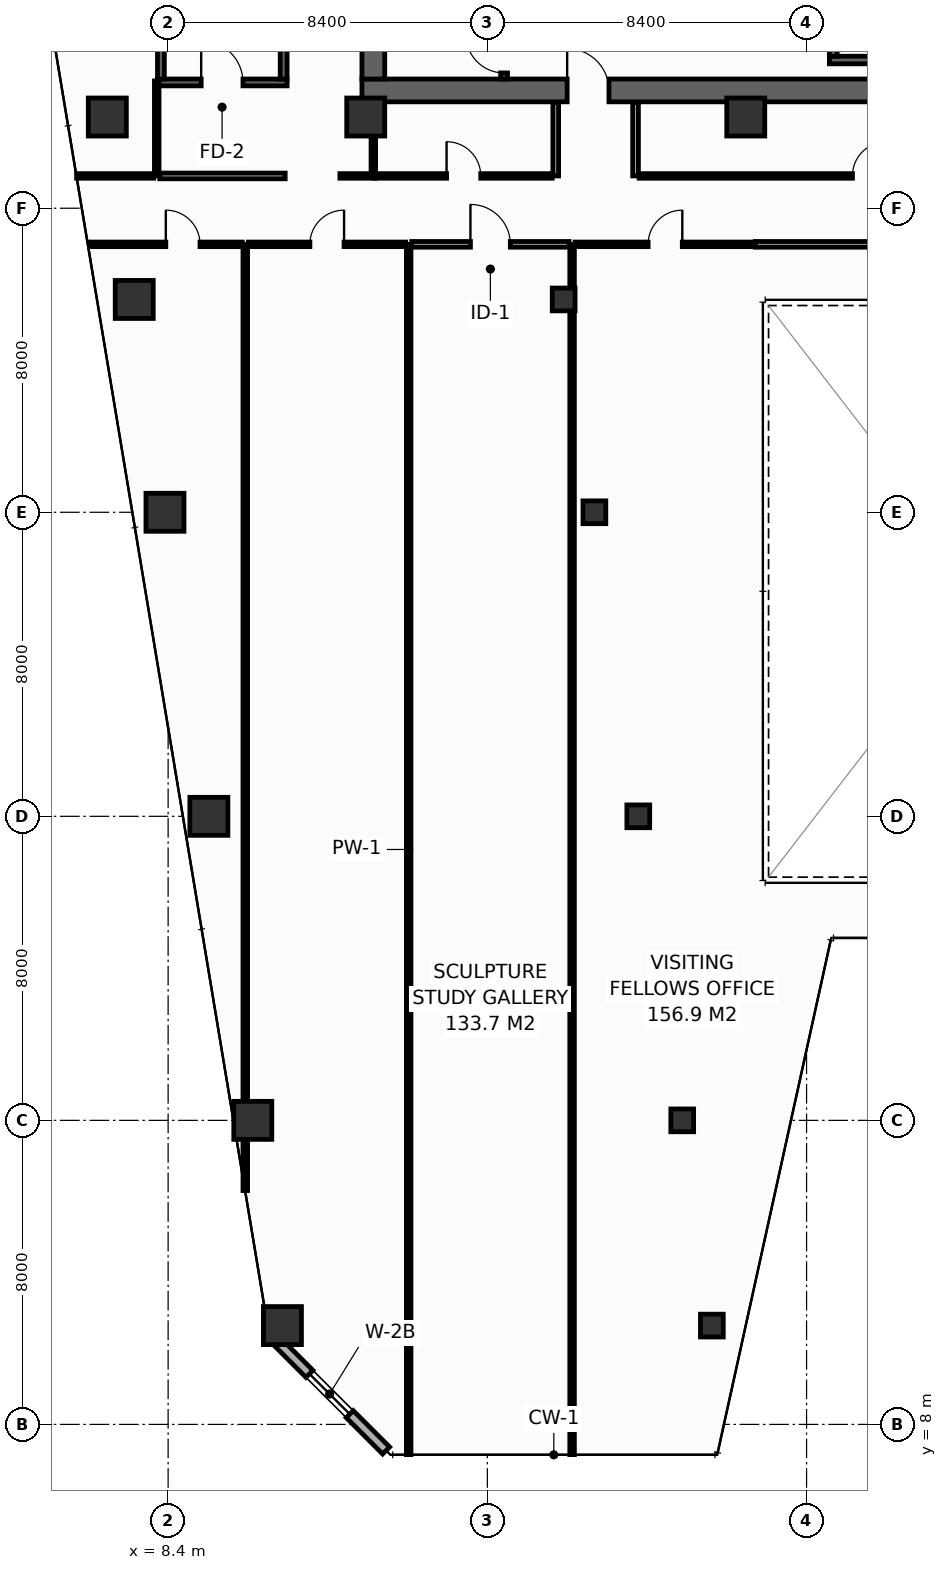
"""IFC4 building model, lengths in metres.
Left out: names, types, materials, properties, quantities, classifications, styles, units other than length and angle.
Written with IfcOpenShell. Run it as: python <this file> out.ifc"""

import sys

from ifc_helpers import new_model, si_unit, direction, frame, frame_2d, origin, origin_2d, place, context, subcontext, project, spatial, rectangle, hollow_rectangle, extrude, element, fill, save


model = new_model("IFC4")
c1 = context("Model", 3, precision=1e-05, world=origin(), true_north=direction((0.0, 1.0)))
c2 = subcontext(c1, "Body", "Model", "MODEL_VIEW")
j1 = project(units=[si_unit("LENGTHUNIT", "METRE"), si_unit("PLANEANGLEUNIT", "RADIAN")], contexts=[c1])
p1 = place(None, origin())
s1 = spatial("IfcSite", under=j1, at=p1, CompositionType="ELEMENT")
p2 = place(p1, origin())
s2 = spatial("IfcBuilding", under=s1, at=p2, CompositionType="ELEMENT")
p3 = place(p2, frame((0.0, 0.0, 114.8)))
s3 = spatial("IfcBuildingStorey", under=s2, at=p3, CompositionType="ELEMENT", Elevation=114.8)
p4 = place(p3, frame((13.5, 43.1, 0.0), z_axis=(0.0, 0.0, 1.0), x_axis=(1.0, 0.0, 0.0)))
e1 = element("IfcWall", 1, at=p4, inside=s3, PredefinedType="SHEAR", context=c2, shape_type="SweptSolid", body=[
    extrude(rectangle(XDim=32.9, YDim=0.6, at=frame_2d((16.45, 0.0))), origin(), (0.0, 0.0, 1.0), 4.15),
])
p5 = place(p4, frame((5.4, 0.0, 0.0)))
e2 = element("IfcOpeningElement", 2, at=p5, cuts=e1, PredefinedType="OPENING", context=c2, shape_type="SweptSolid", body=[
    extrude(rectangle(XDim=1.1, YDim=2.15, at=frame_2d((0.55, 1.075))), frame((0.0, 0.31, 0.0), z_axis=(0.0, -1.0, 0.0), x_axis=(1.0, 0.0, 0.0)), (0.0, 0.0, 1.0), 0.62),
])
p6 = place(p4, frame((25.6, 0.0, 0.0)))
e3 = element("IfcOpeningElement", 3, at=p6, cuts=e1, PredefinedType="OPENING", context=c2, shape_type="SweptSolid", body=[
    extrude(rectangle(XDim=1.1, YDim=2.15, at=frame_2d((0.55, 1.075))), frame((0.0, 0.31, 0.0), z_axis=(0.0, -1.0, 0.0), x_axis=(1.0, 0.0, 0.0)), (0.0, 0.0, 1.0), 0.62),
])
p7 = place(p3, frame((13.8, 43.4, 0.0), z_axis=(0.0, 0.0, 1.0), x_axis=(0.0, 1.0, 0.0)))
e4 = element("IfcWall", 4, at=p7, inside=s3, PredefinedType="SHEAR", context=c2, shape_type="SweptSolid", body=[
    extrude(rectangle(XDim=10.4, YDim=0.6, at=frame_2d((5.2, 0.0))), origin(), (0.0, 0.0, 1.0), 4.15),
])
for number, where, z_axis, x_axis in (
    (5, (6.8, 42.4, 0.0), (0.0, 0.0, 1.0), (1.0, 0.0, 0.0)),
    (6, (13.6, 42.4, 0.0), (0.0, 0.0, 1.0), (1.0, 0.0, 0.0)),
    (7, (23.6, 42.4, 0.0), (0.0, 0.0, 1.0), (1.0, 0.0, 0.0)),
    (8, (11.408, 10.6, 0.0), (0.0, 0.0, 1.0), (1.0, 0.0, 0.0)),
):
    element("IfcColumn", number, at=place(p3, frame(where, z_axis=z_axis, x_axis=x_axis)), inside=s3, PredefinedType="COLUMN", context=c2, shape_type="SweptSolid", body=[
        extrude(hollow_rectangle(XDim=1.0, YDim=1.0, WallThickness=0.045, at=origin_2d()), origin(), (0.0, 0.0, 1.0), 4.4),
    ])
p8 = place(p3, frame((22.708, 10.6, 0.0), z_axis=(0.0, 0.0, 1.0), x_axis=(1.0, 0.0, 0.0)))
e9 = element("IfcColumn", 9, at=p8, inside=s3, PredefinedType="COLUMN", context=c2, shape_type="SweptSolid", body=[
    extrude(hollow_rectangle(XDim=0.6, YDim=0.6, WallThickness=0.028, at=origin_2d()), origin(), (0.0, 0.0, 1.0), 4.4),
])
p9 = place(p3, frame((10.628, 16.0, 0.0), z_axis=(0.0, 0.0, 1.0), x_axis=(1.0, 0.0, 0.0)))
e10 = element("IfcColumn", 10, at=p9, inside=s3, PredefinedType="COLUMN", context=c2, shape_type="SweptSolid", body=[
    extrude(hollow_rectangle(XDim=1.0, YDim=1.0, WallThickness=0.045, at=origin_2d()), origin(), (0.0, 0.0, 1.0), 4.4),
])
p10 = place(p3, frame((21.928, 16.0, 0.0), z_axis=(0.0, 0.0, 1.0), x_axis=(1.0, 0.0, 0.0)))
e11 = element("IfcColumn", 11, at=p10, inside=s3, PredefinedType="COLUMN", context=c2, shape_type="SweptSolid", body=[
    extrude(hollow_rectangle(XDim=0.6, YDim=0.6, WallThickness=0.028, at=origin_2d()), origin(), (0.0, 0.0, 1.0), 4.4),
])
p11 = place(p3, frame((9.472, 24.0, 0.0), z_axis=(0.0, 0.0, 1.0), x_axis=(1.0, 0.0, 0.0)))
e12 = element("IfcColumn", 12, at=p11, inside=s3, PredefinedType="COLUMN", context=c2, shape_type="SweptSolid", body=[
    extrude(hollow_rectangle(XDim=1.0, YDim=1.0, WallThickness=0.045, at=origin_2d()), origin(), (0.0, 0.0, 1.0), 4.4),
])
p12 = place(p3, frame((20.772, 24.0, 0.0), z_axis=(0.0, 0.0, 1.0), x_axis=(1.0, 0.0, 0.0)))
e13 = element("IfcColumn", 13, at=p12, inside=s3, PredefinedType="COLUMN", context=c2, shape_type="SweptSolid", body=[
    extrude(hollow_rectangle(XDim=0.6, YDim=0.6, WallThickness=0.028, at=origin_2d()), origin(), (0.0, 0.0, 1.0), 4.4),
])
p13 = place(p3, frame((8.317, 32.0, 0.0), z_axis=(0.0, 0.0, 1.0), x_axis=(1.0, 0.0, 0.0)))
e14 = element("IfcColumn", 14, at=p13, inside=s3, PredefinedType="COLUMN", context=c2, shape_type="SweptSolid", body=[
    extrude(hollow_rectangle(XDim=1.0, YDim=1.0, WallThickness=0.045, at=origin_2d()), origin(), (0.0, 0.0, 1.0), 4.4),
])
p14 = place(p3, frame((19.617, 32.0, 0.0), z_axis=(0.0, 0.0, 1.0), x_axis=(1.0, 0.0, 0.0)))
e15 = element("IfcColumn", 15, at=p14, inside=s3, PredefinedType="COLUMN", context=c2, shape_type="SweptSolid", body=[
    extrude(hollow_rectangle(XDim=0.6, YDim=0.6, WallThickness=0.028, at=origin_2d()), origin(), (0.0, 0.0, 1.0), 4.4),
])
p15 = place(p3, frame((7.508, 37.6, 0.0), z_axis=(0.0, 0.0, 1.0), x_axis=(1.0, 0.0, 0.0)))
e16 = element("IfcColumn", 16, at=p15, inside=s3, PredefinedType="COLUMN", context=c2, shape_type="SweptSolid", body=[
    extrude(hollow_rectangle(XDim=1.0, YDim=1.0, WallThickness=0.045, at=origin_2d()), origin(), (0.0, 0.0, 1.0), 4.4),
])
p16 = place(p3, frame((18.808, 37.6, 0.0), z_axis=(0.0, 0.0, 1.0), x_axis=(1.0, 0.0, 0.0)))
e17 = element("IfcColumn", 17, at=p16, inside=s3, PredefinedType="COLUMN", context=c2, shape_type="SweptSolid", body=[
    extrude(hollow_rectangle(XDim=0.6, YDim=0.6, WallThickness=0.028, at=origin_2d()), origin(), (0.0, 0.0, 1.0), 4.4),
])
p17 = place(p3, frame((25.8, 43.9, 0.0), z_axis=(0.0, 0.0, 1.0), x_axis=(1.0, 0.0, 0.0)))
e18 = element("IfcWall", 18, at=p17, inside=s3, PredefinedType="SHEAR", context=c2, shape_type="SweptSolid", body=[
    extrude(rectangle(XDim=2.575, YDim=0.2, at=frame_2d((1.288, 0.0))), origin(), (0.0, 0.0, 1.0), 4.15),
])
p18 = place(p3, frame((25.9, 44.0, 0.0), z_axis=(0.0, 0.0, 1.0), x_axis=(0.0, 1.0, 0.0)))
e19 = element("IfcWall", 19, at=p18, inside=s3, PredefinedType="SHEAR", context=c2, shape_type="SweptSolid", body=[
    extrude(rectangle(XDim=2.3, YDim=0.2, at=frame_2d((1.15, 0.0))), origin(), (0.0, 0.0, 1.0), 4.15),
])
p19 = place(p3, frame((17.24, 43.4, 0.0), z_axis=(0.0, 0.0, 1.0), x_axis=(0.0, 1.0, 0.0)))
e20 = element("IfcWall", 20, at=p19, inside=s3, PredefinedType="SHEAR", context=c2, shape_type="SweptSolid", body=[
    extrude(rectangle(XDim=10.4, YDim=0.18, at=frame_2d((5.2, 0.0))), origin(), (0.0, 0.0, 1.0), 4.15),
])
p20 = place(p19, frame((0.16, 0.0, 0.0)))
e21 = element("IfcOpeningElement", 21, at=p20, cuts=e20, PredefinedType="OPENING", context=c2, shape_type="SweptSolid", body=[
    extrude(rectangle(XDim=1.0, YDim=2.15, at=frame_2d((0.5, 1.075))), frame((0.0, 0.1, 0.0), z_axis=(0.0, -1.0, 0.0), x_axis=(1.0, 0.0, 0.0)), (0.0, 0.0, 1.0), 0.2),
])
p21 = place(p3, frame((8.12, 43.31, 0.0), z_axis=(0.0, 0.0, 1.0), x_axis=(1.0, 0.0, 0.0)))
e22 = element("IfcWall", 22, at=p21, inside=s3, PredefinedType="SHEAR", context=c2, shape_type="SweptSolid", body=[
    extrude(rectangle(XDim=3.41, YDim=0.18, at=frame_2d((1.705, 0.0))), origin(), (0.0, 0.0, 1.0), 4.15),
])
p22 = place(p21, frame((1.15, 0.0, 0.0)))
e23 = element("IfcOpeningElement", 23, at=p22, cuts=e22, PredefinedType="OPENING", context=c2, shape_type="SweptSolid", body=[
    extrude(rectangle(XDim=1.1, YDim=2.15, at=frame_2d((0.55, 1.075))), frame((0.0, 0.1, 0.0), z_axis=(0.0, -1.0, 0.0), x_axis=(1.0, 0.0, 0.0)), (0.0, 0.0, 1.0), 0.2),
])
for number, where, z_axis, x_axis in (
    (24, (11.44, 43.4, 0.0), (0.0, 0.0, 1.0), (0.0, 1.0, 0.0)),
    (25, (8.21, 53.8, 0.0), (0.0, 0.0, 1.0), (0.0, -1.0, 0.0)),
):
    element("IfcWall", number, at=place(p3, frame(where, z_axis=z_axis, x_axis=x_axis)), inside=s3, PredefinedType="SHEAR", context=c2, shape_type="SweptSolid", body=[
        extrude(rectangle(XDim=10.4, YDim=0.18, at=frame_2d((5.2, 0.0))), origin(), (0.0, 0.0, 1.0), 4.15),
    ])
p23 = place(p3, frame((11.162, 10.287, 0.0), z_axis=(0.0, 0.0, 1.0), x_axis=(0.70707775441, -0.707135806771, 0.0)))
e26 = element("IfcWall", 26, at=p23, inside=s3, PredefinedType="STANDARD", context=c2, shape_type="SweptSolid", body=[
    extrude(rectangle(XDim=4.206, YDim=0.26, at=frame_2d((2.103, 0.0))), origin(), (0.0, 0.0, 1.0), 4.15),
])
p24 = place(p23, frame((1.353, 0.0, 0.9)))
e27 = element("IfcOpeningElement", 27, at=p24, cuts=e26, PredefinedType="OPENING", context=c2, shape_type="SweptSolid", body=[
    extrude(rectangle(XDim=1.5, YDim=1.85, at=frame_2d((0.75, 0.925))), frame((0.0, 0.14, 0.0), z_axis=(0.0, -1.0, 0.0), x_axis=(1.0, 0.0, 0.0)), (0.0, 0.0, 1.0), 0.28),
])
p25 = place(p3, frame((12.92, 40.85, 0.0), z_axis=(0.0, 0.0, 1.0), x_axis=(1.0, 0.0, 0.0)))
e28 = element("IfcWall", 28, at=p25, inside=s3, PredefinedType="PARTITIONING", context=c2, shape_type="SweptSolid", body=[
    extrude(rectangle(XDim=0.93, YDim=0.12, at=frame_2d((0.465, 0.0))), origin(), (0.0, 0.0, 1.0), 4.15),
])
p26 = place(p3, frame((13.8, 40.93, 0.0), z_axis=(0.0, 0.0, 1.0), x_axis=(0.0, 1.0, 0.0)))
e29 = element("IfcWall", 29, at=p26, inside=s3, PredefinedType="PARTITIONING", context=c2, shape_type="SweptSolid", body=[
    extrude(rectangle(XDim=1.85, YDim=0.12, at=frame_2d((0.925, 0.0))), origin(), (0.0, 0.0, 1.0), 4.15),
])
p27 = place(p3, frame((8.1, 40.85, 0.0), z_axis=(0.0, 0.0, 1.0), x_axis=(0.0, 1.0, 0.0)))
e30 = element("IfcWall", 30, at=p27, inside=s3, PredefinedType="PARTITIONING", context=c2, shape_type="SweptSolid", body=[
    extrude(rectangle(XDim=2.5, YDim=0.12, at=frame_2d((1.25, 0.0))), origin(), (0.0, 0.0, 1.0), 3.335),
])
p28 = place(p3, frame((8.18, 40.85, 0.0), z_axis=(0.0, 0.0, 1.0), x_axis=(1.0, 0.0, 0.0)))
e31 = element("IfcWall", 31, at=p28, inside=s3, PredefinedType="PARTITIONING", context=c2, shape_type="SweptSolid", body=[
    extrude(rectangle(XDim=3.3, YDim=0.15, at=frame_2d((1.65, 0.0))), origin(), (0.0, 0.0, 1.0), 4.15),
])
p29 = place(p3, frame((5.992, 40.85, 0.0), z_axis=(0.0, 0.0, 1.0), x_axis=(1.0, 0.0, 0.0)))
e32 = element("IfcWall", 32, at=p29, inside=s3, PredefinedType="PARTITIONING", context=c2, shape_type="SweptSolid", body=[
    extrude(rectangle(XDim=2.028, YDim=0.12, at=frame_2d((1.014, 0.0))), origin(), (0.0, 0.0, 1.0), 3.635),
])
for number, where, z_axis, x_axis in (
    (33, (18.6, 40.85, 0.0), (0.0, 0.0, 1.0), (0.0, 1.0, 0.0)),
    (34, (20.7, 40.85, 0.0), (0.0, 0.0, 1.0), (0.0, 1.0, 0.0)),
):
    element("IfcWall", number, at=place(p3, frame(where, z_axis=z_axis, x_axis=x_axis)), inside=s3, PredefinedType="PARTITIONING", context=c2, shape_type="SweptSolid", body=[
        extrude(rectangle(XDim=1.93, YDim=0.15, at=frame_2d((0.965, 0.0))), origin(), (0.0, 0.0, 1.0), 4.15),
    ])
p30 = place(p3, frame((13.85, 40.85, 0.0), z_axis=(0.0, 0.0, 1.0), x_axis=(1.0, 0.0, 0.0)))
e35 = element("IfcWall", 35, at=p30, inside=s3, PredefinedType="PARTITIONING", context=c2, shape_type="SweptSolid", body=[
    extrude(rectangle(XDim=4.655, YDim=0.12, at=frame_2d((2.327, 0.0))), origin(), (0.0, 0.0, 1.0), 4.15),
])
p31 = place(p30, frame((1.877, 0.0, 0.0)))
e36 = element("IfcOpeningElement", 36, at=p31, cuts=e35, PredefinedType="OPENING", context=c2, shape_type="SweptSolid", body=[
    extrude(rectangle(XDim=0.9, YDim=2.1, at=frame_2d((0.45, 1.05))), frame((0.0, 0.07, 0.0), z_axis=(0.0, -1.0, 0.0), x_axis=(1.0, 0.0, 0.0)), (0.0, 0.0, 1.0), 0.14),
])
p32 = place(p3, frame((20.795, 40.85, 0.0), z_axis=(0.0, 0.0, 1.0), x_axis=(1.0, 0.0, 0.0)))
e37 = element("IfcWall", 37, at=p32, inside=s3, PredefinedType="PARTITIONING", context=c2, shape_type="SweptSolid", body=[
    extrude(rectangle(XDim=12.125, YDim=0.12, at=frame_2d((6.062, 0.0))), origin(), (0.0, 0.0, 1.0), 3.335),
])
p33 = place(p32, frame((5.612, 0.0, 0.0)))
e38 = element("IfcOpeningElement", 38, at=p33, cuts=e37, PredefinedType="OPENING", context=c2, shape_type="SweptSolid", body=[
    extrude(rectangle(XDim=0.9, YDim=2.1, at=frame_2d((0.45, 1.05))), frame((0.0, 0.07, 0.0), z_axis=(0.0, -1.0, 0.0), x_axis=(1.0, 0.0, 0.0)), (0.0, 0.0, 1.0), 0.14),
])
p34 = place(p3, frame((10.43, 14.153, 0.0), z_axis=(0.0, 0.0, 1.0), x_axis=(0.0, 1.0, 0.0)))
e39 = element("IfcWall", 39, at=p34, inside=s3, PredefinedType="PARTITIONING", context=c2, shape_type="SweptSolid", body=[
    extrude(rectangle(XDim=24.897, YDim=0.12, at=frame_2d((12.448, 0.0))), origin(), (0.0, 0.0, 1.0), 3.335),
])
for number, where, z_axis, x_axis in (
    (40, (14.73, 7.205, 0.0), (0.0, 0.0, 1.0), (0.0, 1.0, 0.0)),
    (41, (19.03, 7.205, 0.0), (0.0, 0.0, 1.0), (0.0, 1.0, 0.0)),
):
    element("IfcWall", number, at=place(p3, frame(where, z_axis=z_axis, x_axis=x_axis)), inside=s3, PredefinedType="PARTITIONING", context=c2, shape_type="SweptSolid", body=[
        extrude(rectangle(XDim=31.845, YDim=0.12, at=frame_2d((15.922, 0.0))), origin(), (0.0, 0.0, 1.0), 3.335),
    ])
p35 = place(p3, frame((6.348, 39.05, 0.0), z_axis=(0.0, 0.0, 1.0), x_axis=(1.0, 0.0, 0.0)))
e42 = element("IfcWall", 42, at=p35, inside=s3, PredefinedType="PARTITIONING", context=c2, shape_type="SweptSolid", body=[
    extrude(rectangle(XDim=4.002, YDim=0.12, at=frame_2d((2.001, 0.0))), origin(), (0.0, 0.0, 1.0), 3.635),
])
p36 = place(p35, frame((1.991, 0.0, 0.0)))
e43 = element("IfcOpeningElement", 43, at=p36, cuts=e42, PredefinedType="OPENING", context=c2, shape_type="SweptSolid", body=[
    extrude(rectangle(XDim=0.9, YDim=2.1, at=frame_2d((0.45, 1.05))), frame((0.0, 0.07, 0.0), z_axis=(0.0, -1.0, 0.0), x_axis=(1.0, 0.0, 0.0)), (0.0, 0.0, 1.0), 0.14),
])
p37 = place(p3, frame((10.51, 39.05, 0.0), z_axis=(0.0, 0.0, 1.0), x_axis=(1.0, 0.0, 0.0)))
e44 = element("IfcWall", 44, at=p37, inside=s3, PredefinedType="PARTITIONING", context=c2, shape_type="SweptSolid", body=[
    extrude(rectangle(XDim=4.14, YDim=0.12, at=frame_2d((2.07, 0.0))), origin(), (0.0, 0.0, 1.0), 4.15),
])
p38 = place(p37, frame((1.62, 0.0, 0.0)))
e45 = element("IfcOpeningElement", 45, at=p38, cuts=e44, PredefinedType="OPENING", context=c2, shape_type="SweptSolid", body=[
    extrude(rectangle(XDim=0.9, YDim=2.1, at=frame_2d((0.45, 1.05))), frame((0.0, 0.07, 0.0), z_axis=(0.0, -1.0, 0.0), x_axis=(1.0, 0.0, 0.0)), (0.0, 0.0, 1.0), 0.14),
])
p39 = place(p3, frame((14.81, 39.05, 0.0), z_axis=(0.0, 0.0, 1.0), x_axis=(1.0, 0.0, 0.0)))
e46 = element("IfcWall", 46, at=p39, inside=s3, PredefinedType="PARTITIONING", context=c2, shape_type="SweptSolid", body=[
    extrude(rectangle(XDim=4.14, YDim=0.15, at=frame_2d((2.07, 0.0))), origin(), (0.0, 0.0, 1.0), 4.15),
])
p40 = place(p39, frame((1.545, 0.0, 0.0)))
e47 = element("IfcOpeningElement", 47, at=p40, cuts=e46, PredefinedType="OPENING", context=c2, shape_type="SweptSolid", body=[
    extrude(rectangle(XDim=1.05, YDim=2.15, at=frame_2d((0.525, 1.075))), frame((0.0, 0.085, 0.0), z_axis=(0.0, -1.0, 0.0), x_axis=(1.0, 0.0, 0.0)), (0.0, 0.0, 1.0), 0.17),
])
p41 = place(p3, frame((19.11, 39.05, 0.0), z_axis=(0.0, 0.0, 1.0), x_axis=(1.0, 0.0, 0.0)))
e48 = element("IfcWall", 48, at=p41, inside=s3, PredefinedType="PARTITIONING", context=c2, shape_type="SweptSolid", body=[
    extrude(rectangle(XDim=4.74, YDim=0.12, at=frame_2d((2.37, 0.0))), origin(), (0.0, 0.0, 1.0), 3.335),
])
p42 = place(p41, frame((1.92, 0.0, 0.0)))
e49 = element("IfcOpeningElement", 49, at=p42, cuts=e48, PredefinedType="OPENING", context=c2, shape_type="SweptSolid", body=[
    extrude(rectangle(XDim=0.9, YDim=2.1, at=frame_2d((0.45, 1.05))), frame((0.0, 0.07, 0.0), z_axis=(0.0, -1.0, 0.0), x_axis=(1.0, 0.0, 0.0)), (0.0, 0.0, 1.0), 0.14),
])
p43 = place(p3, frame((23.85, 39.05, 0.0), z_axis=(0.0, 0.0, 1.0), x_axis=(1.0, 0.0, 0.0)))
e50 = element("IfcWall", 50, at=p43, inside=s3, PredefinedType="PARTITIONING", context=c2, shape_type="SweptSolid", body=[
    extrude(rectangle(XDim=12.3, YDim=0.15, at=frame_2d((6.15, 0.0))), origin(), (0.0, 0.0, 1.0), 4.15),
])
p44 = place(p20, origin())
e51 = element("IfcDoor", 51, at=p44, inside=s3, OperationType="SINGLE_SWING_RIGHT", PredefinedType="DOOR", context=c2, shape_type="SweptSolid", body=[
    extrude(rectangle(XDim=1.0, YDim=2.15, at=frame_2d((0.5, 1.075))), frame((0.0, 0.025, 0.0), z_axis=(0.0, -1.0, 0.0), x_axis=(1.0, 0.0, 0.0)), (0.0, 0.0, 1.0), 0.05),
])
fill(e21, e51)
p45 = place(p22, origin())
e52 = element("IfcDoor", 52, at=p45, inside=s3, OperationType="SINGLE_SWING_LEFT", PredefinedType="DOOR", context=c2, shape_type="SweptSolid", body=[
    extrude(rectangle(XDim=1.1, YDim=2.15, at=frame_2d((0.55, 1.075))), frame((0.0, 0.025, 0.0), z_axis=(0.0, -1.0, 0.0), x_axis=(1.0, 0.0, 0.0)), (0.0, 0.0, 1.0), 0.05),
])
fill(e23, e52)
p46 = place(p5, origin())
e53 = element("IfcDoor", 53, at=p46, inside=s3, OperationType="SINGLE_SWING_LEFT", PredefinedType="DOOR", context=c2, shape_type="SweptSolid", body=[
    extrude(rectangle(XDim=1.1, YDim=2.15, at=frame_2d((0.55, 1.075))), frame((0.0, 0.025, 0.0), z_axis=(0.0, -1.0, 0.0), x_axis=(1.0, 0.0, 0.0)), (0.0, 0.0, 1.0), 0.05),
])
fill(e2, e53)
p47 = place(p24, origin())
e54 = element("IfcWindow", 54, at=p47, inside=s3, PartitioningType="SINGLE_PANEL", PredefinedType="WINDOW", context=c2, shape_type="SweptSolid", body=[
    extrude(rectangle(XDim=1.5, YDim=1.85, at=frame_2d((0.75, 0.925))), frame((0.0, 0.03, 0.0), z_axis=(0.0, -1.0, 0.0), x_axis=(1.0, 0.0, 0.0)), (0.0, 0.0, 1.0), 0.06),
])
fill(e27, e54)
p48 = place(p31, origin())
e55 = element("IfcDoor", 55, at=p48, inside=s3, OperationType="SINGLE_SWING_LEFT", PredefinedType="DOOR", context=c2, shape_type="SweptSolid", body=[
    extrude(rectangle(XDim=0.9, YDim=2.1, at=frame_2d((0.45, 1.05))), frame((0.0, 0.025, 0.0), z_axis=(0.0, -1.0, 0.0), x_axis=(1.0, 0.0, 0.0)), (0.0, 0.0, 1.0), 0.05),
])
fill(e36, e55)
p49 = place(p33, origin())
e56 = element("IfcDoor", 56, at=p49, inside=s3, OperationType="SINGLE_SWING_RIGHT", PredefinedType="DOOR", context=c2, shape_type="SweptSolid", body=[
    extrude(rectangle(XDim=0.9, YDim=2.1, at=frame_2d((0.45, 1.05))), frame((0.0, 0.025, 0.0), z_axis=(0.0, -1.0, 0.0), x_axis=(1.0, 0.0, 0.0)), (0.0, 0.0, 1.0), 0.05),
])
fill(e38, e56)
p50 = place(p36, origin())
e57 = element("IfcDoor", 57, at=p50, inside=s3, OperationType="SINGLE_SWING_LEFT", PredefinedType="DOOR", context=c2, shape_type="SweptSolid", body=[
    extrude(rectangle(XDim=0.9, YDim=2.1, at=frame_2d((0.45, 1.05))), frame((0.0, 0.025, 0.0), z_axis=(0.0, -1.0, 0.0), x_axis=(1.0, 0.0, 0.0)), (0.0, 0.0, 1.0), 0.05),
])
fill(e43, e57)
p51 = place(p38, origin())
e58 = element("IfcDoor", 58, at=p51, inside=s3, OperationType="SINGLE_SWING_RIGHT", PredefinedType="DOOR", context=c2, shape_type="SweptSolid", body=[
    extrude(rectangle(XDim=0.9, YDim=2.1, at=frame_2d((0.45, 1.05))), frame((0.0, 0.025, 0.0), z_axis=(0.0, -1.0, 0.0), x_axis=(1.0, 0.0, 0.0)), (0.0, 0.0, 1.0), 0.05),
])
fill(e45, e58)
p52 = place(p40, origin())
e59 = element("IfcDoor", 59, at=p52, inside=s3, OperationType="SINGLE_SWING_LEFT", PredefinedType="DOOR", context=c2, shape_type="SweptSolid", body=[
    extrude(rectangle(XDim=1.05, YDim=2.15, at=frame_2d((0.525, 1.075))), frame((0.0, 0.025, 0.0), z_axis=(0.0, -1.0, 0.0), x_axis=(1.0, 0.0, 0.0)), (0.0, 0.0, 1.0), 0.05),
])
fill(e47, e59)
p53 = place(p42, origin())
e60 = element("IfcDoor", 60, at=p53, inside=s3, OperationType="SINGLE_SWING_RIGHT", PredefinedType="DOOR", context=c2, shape_type="SweptSolid", body=[
    extrude(rectangle(XDim=0.9, YDim=2.1, at=frame_2d((0.45, 1.05))), frame((0.0, 0.025, 0.0), z_axis=(0.0, -1.0, 0.0), x_axis=(1.0, 0.0, 0.0)), (0.0, 0.0, 1.0), 0.05),
])
fill(e49, e60)
save(model, sys.argv[1])
